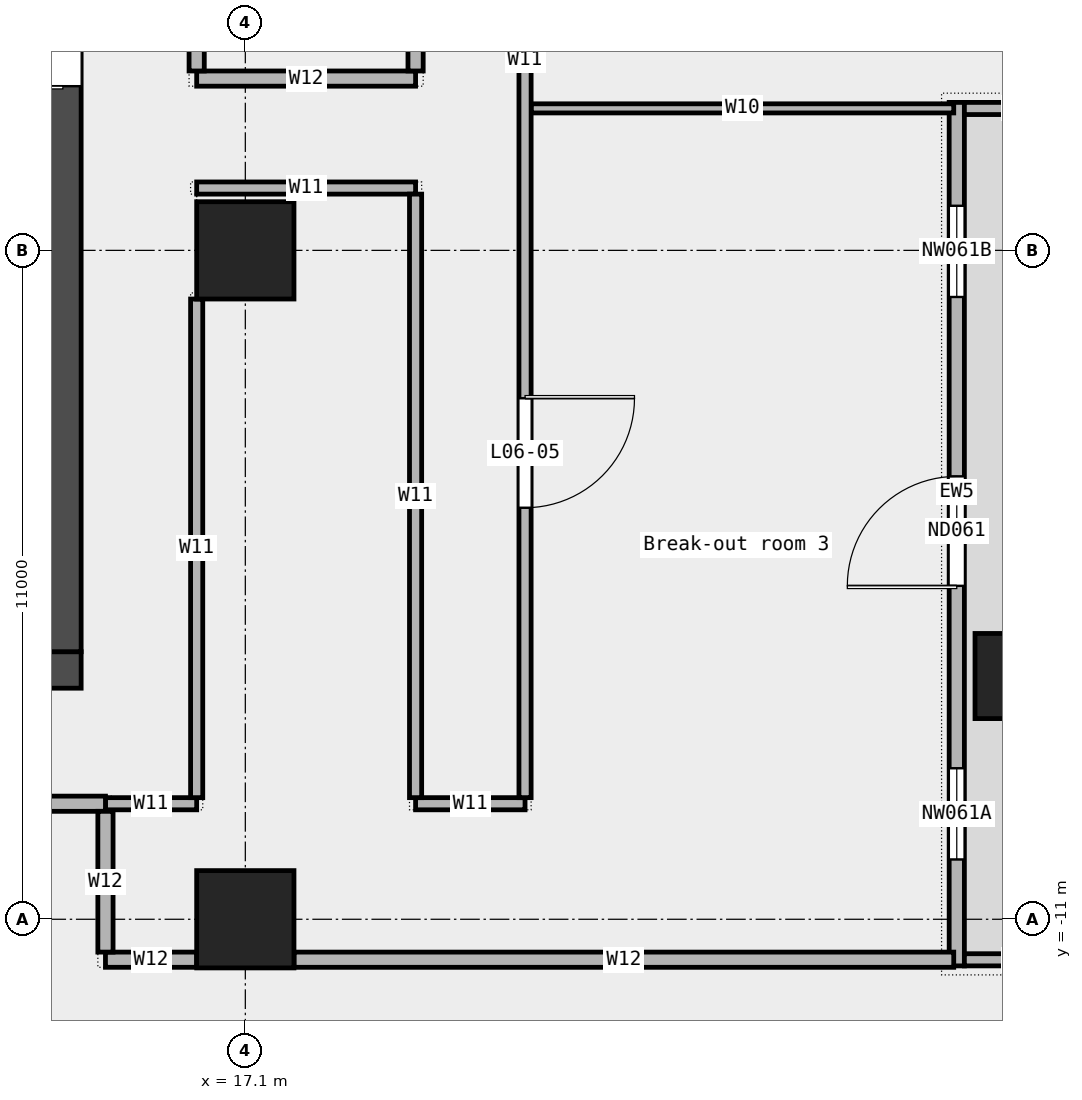
"""IFC4 building model, lengths in metres.
Left out: names, types, materials, properties, quantities, classifications, styles, units other than length and angle.
Written with IfcOpenShell. Run it as: python <this file> out.ifc"""

import sys

from ifc_helpers import new_model, si_unit, direction, frame, frame_2d, origin, origin_2d, place, context, subcontext, project, spatial, rectangle, extrude, element, fill, save


model = new_model("IFC4")
c1 = context("Model", 3, precision=1e-05, world=origin(), true_north=direction((0.0, 1.0)))
c2 = subcontext(c1, "Body", "Model", "MODEL_VIEW")
j1 = project(units=[si_unit("LENGTHUNIT", "METRE"), si_unit("PLANEANGLEUNIT", "RADIAN")], contexts=[c1])
p1 = place(None, origin())
s1 = spatial("IfcSite", under=j1, at=p1, CompositionType="ELEMENT")
p2 = place(p1, origin())
s2 = spatial("IfcBuilding", under=s1, at=p2, CompositionType="ELEMENT")
p3 = place(p2, frame((0.0, 0.0, 35.8)))
s3 = spatial("IfcBuildingStorey", under=s2, at=p3, CompositionType="ELEMENT", Elevation=35.8)
p4 = place(p3, frame((29.8, -7.0, 0.0), z_axis=(0.0, 0.0, 1.0), x_axis=(1.0, 0.0, 0.0)))
e1 = element("IfcColumn", 1, at=p4, inside=s3, PredefinedType="COLUMN", context=c2, shape_type="SweptSolid", body=[
    extrude(rectangle(XDim=1.4, YDim=1.4, at=origin_2d()), origin(), (0.0, 0.0, 1.0), 4.35),
])
for number, where, z_axis, x_axis in (
    (2, (17.1, -11.0, 0.0), (0.0, 0.0, 1.0), (1.0, 0.0, 0.0)),
    (3, (17.1, 0.0, 0.0), (0.0, 0.0, 1.0), (1.0, 0.0, 0.0)),
):
    element("IfcColumn", number, at=place(p3, frame(where, z_axis=z_axis, x_axis=x_axis)), inside=s3, PredefinedType="COLUMN", context=c2, shape_type="SweptSolid", body=[
        extrude(rectangle(XDim=1.6, YDim=1.6, at=origin_2d()), origin(), (0.0, 0.0, 1.0), 4.35),
    ])
p5 = place(p3, frame((28.8, -11.767, 0.0), z_axis=(0.0, 0.0, 1.0), x_axis=(0.0, 1.0, 0.0)))
e4 = element("IfcWall", 4, at=p5, inside=s3, PredefinedType="STANDARD", context=c2, shape_type="SweptSolid", body=[
    extrude(rectangle(XDim=14.2, YDim=0.25, at=frame_2d((7.1, 0.0))), origin(), (0.0, 0.0, 1.0), 4.35),
])
p6 = place(p5, frame((1.75, 0.0, 0.45)))
e5 = element("IfcOpeningElement", 5, at=p6, cuts=e4, PredefinedType="OPENING", context=c2, shape_type="SweptSolid", body=[
    extrude(rectangle(XDim=1.5, YDim=3.0, at=frame_2d((0.75, 1.5))), frame((0.0, 0.137, 0.0), z_axis=(0.0, -1.0, 0.0), x_axis=(1.0, 0.0, 0.0)), (0.0, 0.0, 1.0), 0.274),
])
p7 = place(p5, frame((6.25, 0.0, 0.0)))
e6 = element("IfcOpeningElement", 6, at=p7, cuts=e4, PredefinedType="OPENING", context=c2, shape_type="SweptSolid", body=[
    extrude(rectangle(XDim=1.8, YDim=2.4, at=frame_2d((0.9, 1.2))), frame((0.0, 0.137, 0.0), z_axis=(0.0, -1.0, 0.0), x_axis=(1.0, 0.0, 0.0)), (0.0, 0.0, 1.0), 0.274),
])
p8 = place(p5, frame((11.0, 0.0, 0.45)))
e7 = element("IfcOpeningElement", 7, at=p8, cuts=e4, PredefinedType="OPENING", context=c2, shape_type="SweptSolid", body=[
    extrude(rectangle(XDim=1.5, YDim=3.0, at=frame_2d((0.75, 1.5))), frame((0.0, 0.137, 0.0), z_axis=(0.0, -1.0, 0.0), x_axis=(1.0, 0.0, 0.0)), (0.0, 0.0, 1.0), 0.274),
])
for number, where, z_axis, x_axis in (
    (8, (30.8, -11.667, 0.0), (0.0, 0.0, 1.0), (-1.0, 0.0, 0.0)),
    (9, (30.8, 2.333, 0.0), (0.0, 0.0, 1.0), (-1.0, 0.0, 0.0)),
):
    element("IfcWall", number, at=place(p3, frame(where, z_axis=z_axis, x_axis=x_axis)), inside=s3, PredefinedType="STANDARD", context=c2, shape_type="SweptSolid", body=[
        extrude(rectangle(XDim=1.875, YDim=0.2, at=frame_2d((0.938, 0.0))), origin(), (0.0, 0.0, 1.0), 4.35),
    ])
p9 = place(p3, frame((14.8, -11.665, 0.0), z_axis=(0.0, 0.0, 1.0), x_axis=(1.0, 0.0, 0.0)))
e10 = element("IfcWall", 10, at=p9, inside=s3, PredefinedType="PARTITIONING", context=c2, shape_type="SweptSolid", body=[
    extrude(rectangle(XDim=1.5, YDim=0.25, at=frame_2d((0.75, 0.0))), origin(), (0.0, 0.0, 1.0), 4.35),
])
p10 = place(p3, frame((17.9, -11.665, 0.0), z_axis=(0.0, 0.0, 1.0), x_axis=(1.0, 0.0, 0.0)))
e11 = element("IfcWall", 11, at=p10, inside=s3, PredefinedType="PARTITIONING", context=c2, shape_type="SweptSolid", body=[
    extrude(rectangle(XDim=10.85, YDim=0.25, at=frame_2d((5.425, 0.0))), origin(), (0.0, 0.0, 1.0), 4.35),
])
p11 = place(p3, frame((14.8, -9.1, 0.0), z_axis=(0.0, 0.0, 1.0), x_axis=(1.0, 0.0, 0.0)))
e12 = element("IfcWall", 12, at=p11, inside=s3, PredefinedType="PARTITIONING", context=c2, shape_type="SweptSolid", body=[
    extrude(rectangle(XDim=1.5, YDim=0.2, at=frame_2d((0.75, 0.0))), origin(), (0.0, 0.0, 1.0), 4.35),
])
p12 = place(p3, frame((19.9, -9.1, 0.0), z_axis=(0.0, 0.0, 1.0), x_axis=(1.0, 0.0, 0.0)))
e13 = element("IfcWall", 13, at=p12, inside=s3, PredefinedType="PARTITIONING", context=c2, shape_type="SweptSolid", body=[
    extrude(rectangle(XDim=1.8, YDim=0.2, at=frame_2d((0.9, 0.0))), origin(), (0.0, 0.0, 1.0), 4.35),
])
p13 = place(p3, frame((-14.8, -9.1, 0.0), z_axis=(0.0, 0.0, 1.0), x_axis=(1.0, 0.0, 0.0)))
e14 = element("IfcWall", 14, at=p13, inside=s3, PredefinedType="PARTITIONING", context=c2, shape_type="SweptSolid", body=[
    extrude(rectangle(XDim=29.6, YDim=0.25, at=frame_2d((14.8, 0.0))), origin(), (0.0, 0.0, 1.0), 4.35),
])
p14 = place(p13, frame((22.998, 0.0, 0.0)))
e15 = element("IfcOpeningElement", 15, at=p14, cuts=e14, PredefinedType="OPENING", context=c2, shape_type="SweptSolid", body=[
    extrude(rectangle(XDim=1.8, YDim=2.1, at=frame_2d((0.9, 1.05))), frame((0.0, 0.137, 0.0), z_axis=(0.0, -1.0, 0.0), x_axis=(1.0, 0.0, 0.0)), (0.0, 0.0, 1.0), 0.274),
])
p15 = place(p13, frame((9.998, 0.0, 0.0)))
e16 = element("IfcOpeningElement", 16, at=p15, cuts=e14, PredefinedType="OPENING", context=c2, shape_type="SweptSolid", body=[
    extrude(rectangle(XDim=1.8, YDim=2.1, at=frame_2d((0.9, 1.05))), frame((0.0, 0.137, 0.0), z_axis=(0.0, -1.0, 0.0), x_axis=(1.0, 0.0, 0.0)), (0.0, 0.0, 1.0), 0.274),
])
p16 = place(p3, frame((16.3, 1.025, 0.0), z_axis=(0.0, 0.0, 1.0), x_axis=(1.0, 0.0, 0.0)))
e17 = element("IfcWall", 17, at=p16, inside=s3, PredefinedType="PARTITIONING", context=c2, shape_type="SweptSolid", body=[
    extrude(rectangle(XDim=3.6, YDim=0.2, at=frame_2d((1.8, 0.0))), origin(), (0.0, 0.0, 1.0), 4.35),
])
p17 = place(p3, frame((21.8, 2.335, 0.0), z_axis=(0.0, 0.0, 1.0), x_axis=(1.0, 0.0, 0.0)))
e18 = element("IfcWall", 18, at=p17, inside=s3, PredefinedType="PARTITIONING", context=c2, shape_type="SweptSolid", body=[
    extrude(rectangle(XDim=6.95, YDim=0.15, at=frame_2d((3.475, 0.0))), origin(), (0.0, 0.0, 1.0), 4.35),
])
p18 = place(p3, frame((16.3, 2.825, 0.0), z_axis=(0.0, 0.0, 1.0), x_axis=(1.0, 0.0, 0.0)))
e19 = element("IfcWall", 19, at=p18, inside=s3, PredefinedType="PARTITIONING", context=c2, shape_type="SweptSolid", body=[
    extrude(rectangle(XDim=3.6, YDim=0.25, at=frame_2d((1.8, 0.0))), origin(), (0.0, 0.0, 1.0), 4.35),
])
p19 = place(p3, frame((14.8, -11.54, 0.0), z_axis=(0.0, 0.0, 1.0), x_axis=(0.0, 1.0, 0.0)))
e20 = element("IfcWall", 20, at=p19, inside=s3, PredefinedType="PARTITIONING", context=c2, shape_type="SweptSolid", body=[
    extrude(rectangle(XDim=2.315, YDim=0.25, at=frame_2d((1.157, 0.0))), origin(), (0.0, 0.0, 1.0), 4.35),
])
p20 = place(p3, frame((16.3, -9.0, 0.0), z_axis=(0.0, 0.0, 1.0), x_axis=(0.0, 1.0, 0.0)))
e21 = element("IfcWall", 21, at=p20, inside=s3, PredefinedType="PARTITIONING", context=c2, shape_type="SweptSolid", body=[
    extrude(rectangle(XDim=8.2, YDim=0.2, at=frame_2d((4.1, 0.0))), origin(), (0.0, 0.0, 1.0), 4.35),
])
p21 = place(p3, frame((16.3, 2.95, 0.0), z_axis=(0.0, 0.0, 1.0), x_axis=(0.0, 1.0, 0.0)))
e22 = element("IfcWall", 22, at=p21, inside=s3, PredefinedType="PARTITIONING", context=c2, shape_type="SweptSolid", body=[
    extrude(rectangle(XDim=7.25, YDim=0.25, at=frame_2d((3.625, 0.0))), origin(), (0.0, 0.0, 1.0), 4.35),
])
p22 = place(p3, frame((19.9, -9.0, 0.0), z_axis=(0.0, 0.0, 1.0), x_axis=(0.0, 1.0, 0.0)))
e23 = element("IfcWall", 23, at=p22, inside=s3, PredefinedType="PARTITIONING", context=c2, shape_type="SweptSolid", body=[
    extrude(rectangle(XDim=9.925, YDim=0.2, at=frame_2d((4.962, 0.0))), origin(), (0.0, 0.0, 1.0), 4.35),
])
p23 = place(p3, frame((19.9, 2.95, 0.0), z_axis=(0.0, 0.0, 1.0), x_axis=(0.0, 1.0, 0.0)))
e24 = element("IfcWall", 24, at=p23, inside=s3, PredefinedType="PARTITIONING", context=c2, shape_type="SweptSolid", body=[
    extrude(rectangle(XDim=12.3, YDim=0.25, at=frame_2d((6.15, 0.0))), origin(), (0.0, 0.0, 1.0), 4.35),
])
p24 = place(p23, frame((9.16, 0.0, 0.0)))
e25 = element("IfcOpeningElement", 25, at=p24, cuts=e24, PredefinedType="OPENING", context=c2, shape_type="SweptSolid", body=[
    extrude(rectangle(XDim=0.9, YDim=2.1, at=frame_2d((0.45, 1.05))), frame((0.0, 0.137, 0.0), z_axis=(0.0, -1.0, 0.0), x_axis=(1.0, 0.0, 0.0)), (0.0, 0.0, 1.0), 0.274),
])
p25 = place(p23, frame((3.01, 0.0, 0.0)))
e26 = element("IfcOpeningElement", 26, at=p25, cuts=e24, PredefinedType="OPENING", context=c2, shape_type="SweptSolid", body=[
    extrude(rectangle(XDim=0.9, YDim=2.1, at=frame_2d((0.45, 1.05))), frame((0.0, 0.137, 0.0), z_axis=(0.0, -1.0, 0.0), x_axis=(1.0, 0.0, 0.0)), (0.0, 0.0, 1.0), 0.274),
])
p26 = place(p3, frame((21.7, -9.0, 0.0), z_axis=(0.0, 0.0, 1.0), x_axis=(0.0, 1.0, 0.0)))
e27 = element("IfcWall", 27, at=p26, inside=s3, PredefinedType="PARTITIONING", context=c2, shape_type="SweptSolid", body=[
    extrude(rectangle(XDim=24.275, YDim=0.2, at=frame_2d((12.137, 0.0))), origin(), (0.0, 0.0, 1.0), 4.35),
])
p27 = place(p26, frame((4.768, 0.0, 0.0)))
e28 = element("IfcOpeningElement", 28, at=p27, cuts=e27, PredefinedType="OPENING", context=c2, shape_type="SweptSolid", body=[
    extrude(rectangle(XDim=1.8, YDim=2.1, at=frame_2d((0.9, 1.05))), frame((0.0, 0.112, 0.0), z_axis=(0.0, -1.0, 0.0), x_axis=(1.0, 0.0, 0.0)), (0.0, 0.0, 1.0), 0.224),
])
p28 = place(p26, frame((17.055, 0.0, 0.0)))
e29 = element("IfcOpeningElement", 29, at=p28, cuts=e27, PredefinedType="OPENING", context=c2, shape_type="SweptSolid", body=[
    extrude(rectangle(XDim=1.5, YDim=2.1, at=frame_2d((0.75, 1.05))), frame((0.0, 0.112, 0.0), z_axis=(0.0, -1.0, 0.0), x_axis=(1.0, 0.0, 0.0)), (0.0, 0.0, 1.0), 0.224),
])
p29 = place(p3, frame((-14.4, -6.9, 0.0), z_axis=(0.0, 0.0, 1.0), x_axis=(1.0, 0.0, 0.0)))
e30 = element("IfcWall", 30, at=p29, inside=s3, PredefinedType="SHEAR", context=c2, shape_type="SweptSolid", body=[
    extrude(rectangle(XDim=28.8, YDim=0.6, at=frame_2d((14.4, 0.0))), origin(), (0.0, 0.0, 1.0), 4.5),
])
p30 = place(p29, frame((4.337, 0.0, 0.0)))
e31 = element("IfcOpeningElement", 31, at=p30, cuts=e30, PredefinedType="OPENING", context=c2, shape_type="SweptSolid", body=[
    extrude(rectangle(XDim=1.0, YDim=2.1, at=frame_2d((0.5, 1.05))), frame((0.0, 0.312, 0.0), z_axis=(0.0, -1.0, 0.0), x_axis=(1.0, 0.0, 0.0)), (0.0, 0.0, 1.0), 0.624),
])
p31 = place(p29, frame((6.212, 0.0, 0.0)))
e32 = element("IfcOpeningElement", 32, at=p31, cuts=e30, PredefinedType="OPENING", context=c2, shape_type="SweptSolid", body=[
    extrude(rectangle(XDim=1.0, YDim=2.1, at=frame_2d((0.5, 1.05))), frame((0.0, 0.312, 0.0), z_axis=(0.0, -1.0, 0.0), x_axis=(1.0, 0.0, 0.0)), (0.0, 0.0, 1.0), 0.624),
])
p32 = place(p29, frame((10.8, 0.0, 0.0)))
e33 = element("IfcOpeningElement", 33, at=p32, cuts=e30, PredefinedType="OPENING", context=c2, shape_type="SweptSolid", body=[
    extrude(rectangle(XDim=1.2, YDim=2.1, at=frame_2d((0.6, 1.05))), frame((0.0, 0.312, 0.0), z_axis=(0.0, -1.0, 0.0), x_axis=(1.0, 0.0, 0.0)), (0.0, 0.0, 1.0), 0.624),
])
p33 = place(p29, frame((15.587, 0.0, 0.0)))
e34 = element("IfcOpeningElement", 34, at=p33, cuts=e30, PredefinedType="OPENING", context=c2, shape_type="SweptSolid", body=[
    extrude(rectangle(XDim=1.0, YDim=2.1, at=frame_2d((0.5, 1.05))), frame((0.0, 0.312, 0.0), z_axis=(0.0, -1.0, 0.0), x_axis=(1.0, 0.0, 0.0)), (0.0, 0.0, 1.0), 0.624),
])
p34 = place(p29, frame((18.75, 0.0, 0.0)))
e35 = element("IfcOpeningElement", 35, at=p34, cuts=e30, PredefinedType="OPENING", context=c2, shape_type="SweptSolid", body=[
    extrude(rectangle(XDim=1.8, YDim=2.1, at=frame_2d((0.9, 1.05))), frame((0.0, 0.312, 0.0), z_axis=(0.0, -1.0, 0.0), x_axis=(1.0, 0.0, 0.0)), (0.0, 0.0, 1.0), 0.624),
])
p35 = place(p29, frame((23.087, 0.0, 0.0)))
e36 = element("IfcOpeningElement", 36, at=p35, cuts=e30, PredefinedType="OPENING", context=c2, shape_type="SweptSolid", body=[
    extrude(rectangle(XDim=1.0, YDim=2.1, at=frame_2d((0.5, 1.05))), frame((0.0, 0.312, 0.0), z_axis=(0.0, -1.0, 0.0), x_axis=(1.0, 0.0, 0.0)), (0.0, 0.0, 1.0), 0.624),
])
p36 = place(p3, frame((14.1, -6.6, 0.0), z_axis=(0.0, 0.0, 1.0), x_axis=(0.0, 1.0, 0.0)))
e37 = element("IfcWall", 37, at=p36, inside=s3, PredefinedType="SHEAR", context=c2, shape_type="SweptSolid", body=[
    extrude(rectangle(XDim=19.5, YDim=0.6, at=frame_2d((9.75, 0.0))), origin(), (0.0, 0.0, 1.0), 4.5),
])
p37 = place(p36, frame((9.3, 0.0, 0.0)))
e38 = element("IfcOpeningElement", 38, at=p37, cuts=e37, PredefinedType="OPENING", context=c2, shape_type="SweptSolid", body=[
    extrude(rectangle(XDim=1.8, YDim=2.1, at=frame_2d((0.9, 1.05))), frame((0.0, 0.312, 0.0), z_axis=(0.0, -1.0, 0.0), x_axis=(1.0, 0.0, 0.0)), (0.0, 0.0, 1.0), 0.624),
])
p38 = place(p6, origin())
e39 = element("IfcWindow", 39, at=p38, inside=s3, PartitioningType="SINGLE_PANEL", PredefinedType="WINDOW", context=c2, shape_type="SweptSolid", body=[
    extrude(rectangle(XDim=1.5, YDim=3.0, at=frame_2d((0.75, 1.5))), frame((0.0, 0.03, 0.0), z_axis=(0.0, -1.0, 0.0), x_axis=(1.0, 0.0, 0.0)), (0.0, 0.0, 1.0), 0.06),
])
fill(e5, e39)
p39 = place(p7, origin())
e40 = element("IfcDoor", 40, at=p39, inside=s3, OperationType="DOUBLE_DOOR_SINGLE_SWING", PredefinedType="DOOR", context=c2, shape_type="SweptSolid", body=[
    extrude(rectangle(XDim=1.8, YDim=2.4, at=frame_2d((0.9, 1.2))), frame((0.0, 0.025, 0.0), z_axis=(0.0, -1.0, 0.0), x_axis=(1.0, 0.0, 0.0)), (0.0, 0.0, 1.0), 0.05),
])
fill(e6, e40)
p40 = place(p8, origin())
e41 = element("IfcWindow", 41, at=p40, inside=s3, PartitioningType="SINGLE_PANEL", PredefinedType="WINDOW", context=c2, shape_type="SweptSolid", body=[
    extrude(rectangle(XDim=1.5, YDim=3.0, at=frame_2d((0.75, 1.5))), frame((0.0, 0.03, 0.0), z_axis=(0.0, -1.0, 0.0), x_axis=(1.0, 0.0, 0.0)), (0.0, 0.0, 1.0), 0.06),
])
fill(e7, e41)
p41 = place(p27, origin())
e42 = element("IfcDoor", 42, at=p41, inside=s3, OperationType="DOUBLE_DOOR_SINGLE_SWING", PredefinedType="DOOR", context=c2, shape_type="SweptSolid", body=[
    extrude(rectangle(XDim=1.8, YDim=2.1, at=frame_2d((0.9, 1.05))), frame((0.0, 0.025, 0.0), z_axis=(0.0, -1.0, 0.0), x_axis=(1.0, 0.0, 0.0)), (0.0, 0.0, 1.0), 0.05),
])
fill(e28, e42)
p42 = place(p37, origin())
e43 = element("IfcDoor", 43, at=p42, inside=s3, OperationType="DOUBLE_DOOR_SINGLE_SWING", PredefinedType="DOOR", context=c2, shape_type="SweptSolid", body=[
    extrude(rectangle(XDim=1.8, YDim=2.1, at=frame_2d((0.9, 1.05))), frame((0.0, 0.025, 0.0), z_axis=(0.0, -1.0, 0.0), x_axis=(1.0, 0.0, 0.0)), (0.0, 0.0, 1.0), 0.05),
])
fill(e38, e43)
save(model, sys.argv[1])
